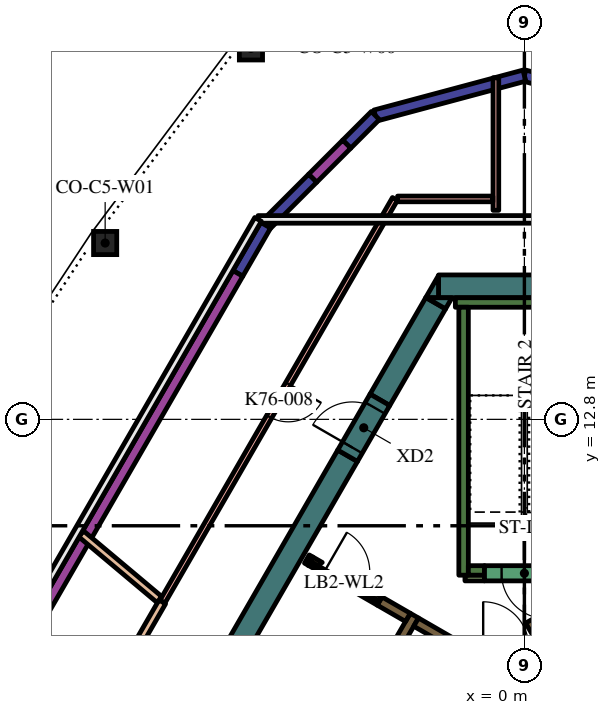
"""IFC4 building model, lengths in metres.
Left out: names, types, materials, properties, quantities, classifications, styles, units other than length and angle.
Written with IfcOpenShell. Run it as: python <this file> out.ifc"""

import sys

from ifc_helpers import new_model, si_unit, direction, frame, frame_2d, origin, origin_2d, place, context, subcontext, project, spatial, polyline, rectangle, hollow_circle, outline, extrude, element, fill, save


model = new_model("IFC4")
c1 = context("Model", 3, precision=1e-05, world=origin(), true_north=direction((0.0, 1.0)))
c2 = subcontext(c1, "Body", "Model", "MODEL_VIEW")
j1 = project(units=[si_unit("LENGTHUNIT", "METRE"), si_unit("PLANEANGLEUNIT", "RADIAN")], contexts=[c1])
p1 = place(None, origin())
s1 = spatial("IfcSite", under=j1, at=p1, CompositionType="ELEMENT")
p2 = place(p1, origin())
s2 = spatial("IfcBuilding", under=s1, at=p2, CompositionType="ELEMENT")
p3 = place(p2, frame((0.0, 0.0, 327.6)))
s3 = spatial("IfcBuildingStorey", under=s2, at=p3, CompositionType="ELEMENT", Elevation=327.6)
for number, where, z_axis, x_axis in (
    (1, (-7.195, 22.561, 0.0), (0.0, 0.0, 1.0), (1.0, 0.0, 0.0)),
    (2, (-11.032, 17.44, 0.0), (0.0, 0.0, 1.0), (1.0, 0.0, 0.0)),
):
    element("IfcColumn", number, at=place(p3, frame(where, z_axis=z_axis, x_axis=x_axis)), inside=s3, PredefinedType="COLUMN", context=c2, shape_type="SweptSolid", body=[
        extrude(hollow_circle(Radius=0.305, WallThickness=0.025, at=origin_2d()), origin(), (0.0, 0.0, 1.0), 4.2),
    ])
p4 = place(p3, frame((-2.258, 16.3, 0.0), z_axis=(0.0, 0.0, 1.0), x_axis=(1.0, 0.0, 0.0)))
e3 = element("IfcWall", 3, at=p4, inside=s3, PredefinedType="SOLIDWALL", context=c2, shape_type="SweptSolid", body=[
    extrude(rectangle(XDim=3.823, YDim=0.6, at=frame_2d((1.912, 0.0))), origin(), (0.0, 0.0, 1.0), 4.2),
])
p5 = place(p3, origin())
e4 = element("IfcWall", 4, at=p5, inside=s3, PredefinedType="SOLIDWALL", context=c2, shape_type="SweptSolid", body=[
    extrude(outline(polyline([(-2.598, 16.0), (-2.26, 16.585), (-2.26, 16.0), (-2.598, 16.0)])), origin(), (0.0, 0.0, 1.0), 4.2),
])
p6 = place(p3, frame((-2.335, 15.855, 0.0), z_axis=(0.0, 0.0, 1.0), x_axis=(-0.499960127962, -0.866048422692, 0.0)))
e5 = element("IfcWall", 5, at=p6, inside=s3, PredefinedType="SOLIDWALL", context=c2, shape_type="SweptSolid", body=[
    extrude(rectangle(XDim=2.934, YDim=0.6, at=frame_2d((1.467, 0.0))), origin(), (0.0, 0.0, 1.0), 4.2),
])
e6 = element("IfcWall", 6, at=p5, inside=s3, PredefinedType="SOLIDWALL", context=c2, shape_type="SweptSolid", body=[
    extrude(outline(polyline([(-1.905, 16.0), (-2.074, 15.707), (-2.581, 16.0), (-1.905, 16.0)])), origin(), (0.0, 0.0, 1.0), 4.2),
])
p7 = place(p3, frame((-4.652, 11.842, 0.0), z_axis=(0.0, 0.0, 1.0), x_axis=(-0.500003640647, -0.866023301845, 0.0)))
e7 = element("IfcWall", 7, at=p7, inside=s3, PredefinedType="SOLIDWALL", context=c2, shape_type="SweptSolid", body=[
    extrude(rectangle(XDim=15.858, YDim=0.6, at=frame_2d((7.929, 0.0))), origin(), (0.0, 0.0, 1.0), 4.2),
])
p8 = place(p3, frame((-1.817, 15.875, 0.0), z_axis=(0.0, 0.0, 1.0), x_axis=(1.0, 0.0, 0.0)))
e8 = element("IfcWall", 8, at=p8, inside=s3, PredefinedType="SOLIDWALL", context=c2, shape_type="SweptSolid", body=[
    extrude(rectangle(XDim=3.634, YDim=0.25, at=frame_2d((1.817, 0.0))), origin(), (0.0, 0.0, 1.0), 4.2),
])
p9 = place(p3, frame((-1.6, 8.7, 0.0), z_axis=(0.0, 0.0, 1.0), x_axis=(0.0, 1.0, 0.0)))
e9 = element("IfcWall", 9, at=p9, inside=s3, PredefinedType="SOLIDWALL", context=c2, shape_type="SweptSolid", body=[
    extrude(rectangle(XDim=7.05, YDim=0.25, at=frame_2d((3.525, 0.0))), origin(), (0.0, 0.0, 1.0), 4.2),
])
p10 = place(p3, frame((-1.475, 8.825, 0.0), z_axis=(0.0, 0.0, 1.0), x_axis=(1.0, 0.0, 0.0)))
e10 = element("IfcWall", 10, at=p10, inside=s3, PredefinedType="SOLIDWALL", context=c2, shape_type="SweptSolid", body=[
    extrude(rectangle(XDim=0.425, YDim=0.25, at=frame_2d((0.212, 0.0))), origin(), (0.0, 0.0, 1.0), 4.2),
])
p11 = place(p3, frame((0.417, 7.027, 0.0), z_axis=(0.0, 0.0, 1.0), x_axis=(-0.500210807569, 0.865903659763, 0.0)))
e11 = element("IfcWall", 11, at=p11, inside=s3, PredefinedType="SOLIDWALL", context=c2, shape_type="SweptSolid", body=[
    extrude(rectangle(XDim=0.548, YDim=0.25, at=frame_2d((0.274, 0.0))), origin(), (0.0, 0.0, 1.0), 4.2),
])
p12 = place(p3, frame((-8.06, -1.311, 0.0), z_axis=(0.0, 0.0, 1.0), x_axis=(0.50000273126, 0.866023826885, 0.0)))
e12 = element("IfcWall", 12, at=p12, inside=s3, PredefinedType="SOLIDWALL", context=c2, shape_type="SweptSolid", body=[
    extrude(rectangle(XDim=10.33, YDim=0.25, at=frame_2d((5.165, 0.0))), origin(), (0.0, 0.0, 1.0), 4.2),
])
p13 = place(p3, frame((-1.76, 6.836, 0.0), z_axis=(0.0, 0.0, 1.0), x_axis=(-0.865952863304, 0.500125622755, 0.0)))
e13 = element("IfcWall", 13, at=p13, inside=s3, PredefinedType="SOLIDWALL", context=c2, shape_type="SweptSolid", body=[
    extrude(rectangle(XDim=1.258, YDim=0.25, at=frame_2d((0.629, 0.0))), origin(), (0.0, 0.0, 1.0), 4.2),
])
p14 = place(p3, frame((-5.725, 9.125, 0.0), z_axis=(0.0, 0.0, 1.0), x_axis=(0.866185586049, -0.49972245349, 0.0)))
e14 = element("IfcWall", 14, at=p14, inside=s3, PredefinedType="SOLIDWALL", context=c2, shape_type="SweptSolid", body=[
    extrude(rectangle(XDim=0.11, YDim=0.25, at=frame_2d((0.055, 0.0))), origin(), (0.0, 0.0, 1.0), 4.2),
])
p15 = place(p3, frame((-3.066, 7.59, 0.0), z_axis=(0.0, 0.0, 1.0), x_axis=(-0.866081358704, 0.49990307071, 0.0)))
e15 = element("IfcWall", 15, at=p15, inside=s3, PredefinedType="SOLIDWALL", context=c2, shape_type="SweptSolid", body=[
    extrude(rectangle(XDim=0.858, YDim=0.25, at=frame_2d((0.429, 0.0))), origin(), (0.0, 0.0, 1.0), 4.2),
])
e16 = element("IfcWall", 16, at=p5, inside=s3, PredefinedType="SOLIDWALL", context=c2, shape_type="SweptSolid", body=[
    extrude(outline(polyline([(-3.748, 8.128), (-3.813, 8.015), (-4.027, 8.139), (-4.017, 8.156), (-4.008, 8.173), (-4.0, 8.192), (-3.995, 8.21), (-3.991, 8.23), (-3.99, 8.25), (-3.99, 8.268), (-3.748, 8.128)])), origin(), (0.0, 0.0, 1.0), 4.2),
])
e17 = element("IfcWall", 17, at=p5, inside=s3, PredefinedType="SOLIDWALL", context=c2, shape_type="SweptSolid", body=[
    extrude(outline(polyline([(-5.689, 8.96), (-5.69, 8.961), (-5.565, 9.177), (-5.319, 9.035), (-5.335, 9.026), (-5.351, 9.015), (-5.366, 9.002), (-5.379, 8.988), (-5.392, 8.972), (-5.402, 8.956), (-5.412, 8.939), (-5.629, 9.064), (-5.629, 9.064), (-5.689, 8.96)])), origin(), (0.0, 0.0, 1.0), 4.2),
])
p16 = place(p3, frame((-1.564, 8.625, 0.0), z_axis=(0.0, 0.0, 1.0), x_axis=(1.0, 0.0, 0.0)))
e18 = element("IfcWall", 18, at=p16, inside=s3, PredefinedType="PARTITIONING", context=c2, shape_type="SweptSolid", body=[
    extrude(rectangle(XDim=0.514, YDim=0.15, at=frame_2d((0.257, 0.0))), origin(), (0.0, 0.0, 1.0), 3.45),
])
p17 = place(p3, frame((1.05, 8.75, 0.0), z_axis=(0.0, 0.0, 1.0), x_axis=(-1.0, 0.0, 0.0)))
e19 = element("IfcWall", 19, at=p17, inside=s3, PredefinedType="SOLIDWALL", context=c2, shape_type="SweptSolid", body=[
    extrude(rectangle(XDim=2.1, YDim=0.4, at=frame_2d((1.05, 0.0))), origin(), (0.0, 0.0, 1.0), 4.2),
])
p18 = place(p17, frame((0.45, 0.0, 0.0)))
e20 = element("IfcOpeningElement", 20, at=p18, cuts=e19, PredefinedType="OPENING", context=c2, shape_type="SweptSolid", body=[
    extrude(rectangle(XDim=1.2, YDim=2.1, at=frame_2d((0.6, 1.05))), frame((0.0, 0.21, 0.0), z_axis=(0.0, -1.0, 0.0), x_axis=(1.0, 0.0, 0.0)), (0.0, 0.0, 1.0), 0.42),
])
p19 = place(p3, frame((-5.659, 9.012, 0.0), z_axis=(0.0, 0.0, 1.0), x_axis=(0.866009402589, -0.500027713859, 0.0)))
e21 = element("IfcWall", 21, at=p19, inside=s3, PredefinedType="PARTITIONING", context=c2, shape_type="SweptSolid", body=[
    extrude(rectangle(XDim=2.1, YDim=0.12, at=frame_2d((1.05, 0.0))), origin(), (0.0, 0.0, 1.0), 3.45),
])
p20 = place(p19, frame((0.45, 0.0, 0.0)))
e22 = element("IfcOpeningElement", 22, at=p20, cuts=e21, PredefinedType="OPENING", context=c2, shape_type="SweptSolid", body=[
    extrude(rectangle(XDim=1.2, YDim=2.1, at=frame_2d((0.6, 1.05))), frame((0.0, 0.07, 0.0), z_axis=(0.0, -1.0, 0.0), x_axis=(1.0, 0.0, 0.0)), (0.0, 0.0, 1.0), 0.14),
])
p21 = place(p3, frame((-4.652, 11.842, 0.0), z_axis=(0.0, 0.0, 1.0), x_axis=(0.500062241894, 0.865989465428, 0.0)))
e23 = element("IfcWall", 23, at=p21, inside=s3, PredefinedType="SOLIDWALL", context=c2, shape_type="SweptSolid", body=[
    extrude(rectangle(XDim=1.7, YDim=0.6, at=frame_2d((0.85, 0.0))), origin(), (0.0, 0.0, 1.0), 4.2),
])
p22 = place(p21, frame((0.25, 0.0, 0.0)))
e24 = element("IfcOpeningElement", 24, at=p22, cuts=e23, PredefinedType="OPENING", context=c2, shape_type="SweptSolid", body=[
    extrude(rectangle(XDim=1.2, YDim=2.1, at=frame_2d((0.6, 1.05))), frame((0.0, 0.31, 0.0), z_axis=(0.0, -1.0, 0.0), x_axis=(1.0, 0.0, 0.0)), (0.0, 0.0, 1.0), 0.62),
])
p23 = place(p3, frame((-9.529, 7.996, 0.0), z_axis=(0.0, 0.0, 1.0), x_axis=(-0.499982954681, -0.866035244681, 0.0)))
e25 = element("IfcWall", 25, at=p23, inside=s3, PredefinedType="PARTITIONING", context=c2, shape_type="SweptSolid", body=[
    extrude(rectangle(XDim=12.439, YDim=0.2, at=frame_2d((6.22, 0.0))), origin(), (0.0, 0.0, 1.0), 3.45),
])
p24 = place(p23, frame((5.62, 0.0, 0.0)))
e26 = element("IfcOpeningElement", 26, at=p24, cuts=e25, PredefinedType="OPENING", context=c2, shape_type="SweptSolid", body=[
    extrude(rectangle(XDim=1.2, YDim=2.1, at=frame_2d((0.6, 1.05))), frame((0.0, 0.11, 0.0), z_axis=(0.0, -1.0, 0.0), x_axis=(1.0, 0.0, 0.0)), (0.0, 0.0, 1.0), 0.22),
])
p25 = place(p3, frame((-3.406, 18.6, 0.0), z_axis=(0.0, 0.0, 1.0), x_axis=(-0.499991334387, -0.866030406821, 0.0)))
e27 = element("IfcWall", 27, at=p25, inside=s3, PredefinedType="PARTITIONING", context=c2, shape_type="SweptSolid", body=[
    extrude(rectangle(XDim=12.235, YDim=0.15, at=frame_2d((6.118, 0.0))), origin(), (0.0, 0.0, 1.0), 3.45),
])
p26 = place(p25, frame((5.617, 0.0, 0.0)))
e28 = element("IfcOpeningElement", 28, at=p26, cuts=e27, PredefinedType="OPENING", context=c2, shape_type="SweptSolid", body=[
    extrude(rectangle(XDim=1.0, YDim=2.1, at=frame_2d((0.5, 1.05))), frame((0.0, 0.085, 0.0), z_axis=(0.0, -1.0, 0.0), x_axis=(1.0, 0.0, 0.0)), (0.0, 0.0, 1.0), 0.17),
])
p27 = place(p3, frame((-0.75, 18.3, 0.0), z_axis=(0.0, 0.0, 1.0), x_axis=(0.0, 1.0, 0.0)))
e29 = element("IfcWall", 29, at=p27, inside=s3, PredefinedType="PARTITIONING", context=c2, shape_type="SweptSolid", body=[
    extrude(rectangle(XDim=3.489, YDim=0.15, at=frame_2d((1.744, 0.0))), origin(), (0.0, 0.0, 1.0), 3.45),
])
p28 = place(p3, frame((-3.336, 18.6, 0.0), z_axis=(0.0, 0.0, 1.0), x_axis=(1.0, 0.0, 0.0)))
e30 = element("IfcWall", 30, at=p28, inside=s3, PredefinedType="PARTITIONING", context=c2, shape_type="SweptSolid", body=[
    extrude(rectangle(XDim=2.506, YDim=0.15, at=frame_2d((1.253, 0.0))), origin(), (0.0, 0.0, 1.0), 3.45),
])
p29 = place(p3, frame((-9.605, 8.06, 0.0), z_axis=(0.0, 0.0, 1.0), x_axis=(-0.766005403392, 0.642834132552, 0.0)))
e31 = element("IfcWall", 31, at=p29, inside=s3, PredefinedType="PARTITIONING", context=c2, shape_type="SweptSolid", body=[
    extrude(rectangle(XDim=2.688, YDim=0.2, at=frame_2d((1.344, 0.0))), origin(), (0.0, 0.0, 1.0), 3.45),
])
for number, where, z_axis, x_axis in (
    (32, (3.922, 20.794, 0.0), (0.0, 0.0, 1.0), (-0.966, 0.259, 0.0)),
    (33, (0.0, 21.845, 0.0), (0.0, 0.0, 1.0), (-0.966, -0.259, 0.0)),
):
    element("IfcWall", number, at=place(p3, frame(where, z_axis=z_axis, x_axis=x_axis)), inside=s3, PredefinedType="SOLIDWALL", context=c2, shape_type="SweptSolid", body=[
        extrude(rectangle(XDim=4.061, YDim=0.3, at=frame_2d((2.03, 0.0))), origin(), (0.0, 0.0, 1.0), 3.95),
    ])
p30 = place(p3, frame((-3.922, 20.794, 0.0), z_axis=(0.0, 0.0, 1.0), x_axis=(-0.707106781187, -0.707106781187, 0.0)))
e34 = element("IfcWall", 34, at=p30, inside=s3, PredefinedType="SOLIDWALL", context=c2, shape_type="SweptSolid", body=[
    extrude(rectangle(XDim=1.065, YDim=0.3, at=frame_2d((0.532, 0.0))), origin(), (0.0, 0.0, 1.0), 3.95),
])
p31 = place(p3, frame((-4.675, 20.041, 0.0), z_axis=(0.0, 0.0, 1.0), x_axis=(-0.707106781187, -0.707106781187, 0.0)))
e35 = element("IfcWall", 35, at=p31, inside=s3, PredefinedType="SOLIDWALL", context=c2, shape_type="SweptSolid", body=[
    extrude(rectangle(XDim=1.264, YDim=0.3, at=frame_2d((0.632, 0.0))), origin(), (0.0, 0.0, 1.0), 3.45),
])
p32 = place(p3, frame((-5.569, 19.147, 0.0), z_axis=(0.0, 0.0, 1.0), x_axis=(-0.707106781187, -0.707106781187, 0.0)))
e36 = element("IfcWall", 36, at=p32, inside=s3, PredefinedType="SOLIDWALL", context=c2, shape_type="SweptSolid", body=[
    extrude(rectangle(XDim=1.752, YDim=0.3, at=frame_2d((0.876, 0.0))), origin(), (0.0, 0.0, 1.0), 3.95),
])
p33 = place(p3, frame((-6.808, 17.908, 0.0), z_axis=(0.0, 0.0, 1.0), x_axis=(-0.499977492351, -0.866038398192, 0.0)))
e37 = element("IfcWall", 37, at=p33, inside=s3, PredefinedType="SOLIDWALL", context=c2, shape_type="SweptSolid", body=[
    extrude(rectangle(XDim=1.464, YDim=0.3, at=frame_2d((0.732, 0.0))), origin(), (0.0, 0.0, 1.0), 3.95),
])
p34 = place(p3, frame((-7.54, 16.64, 0.0), z_axis=(0.0, 0.0, 1.0), x_axis=(-0.500002158106, -0.866024157798, 0.0)))
e38 = element("IfcWall", 38, at=p34, inside=s3, PredefinedType="SOLIDWALL", context=c2, shape_type="SweptSolid", body=[
    extrude(rectangle(XDim=21.282, YDim=0.3, at=frame_2d((10.641, 0.0))), origin(), (0.0, 0.0, 1.0), 3.45),
])
p35 = place(p18, origin())
e39 = element("IfcDoor", 39, at=p35, inside=s3, OperationType="SINGLE_SWING_LEFT", PredefinedType="DOOR", context=c2, shape_type="SweptSolid", body=[
    extrude(rectangle(XDim=1.2, YDim=2.1, at=frame_2d((0.6, 1.05))), frame((0.0, 0.025, 0.0), z_axis=(0.0, -1.0, 0.0), x_axis=(1.0, 0.0, 0.0)), (0.0, 0.0, 1.0), 0.05),
])
fill(e20, e39)
p36 = place(p20, origin())
e40 = element("IfcDoor", 40, at=p36, inside=s3, OperationType="SINGLE_SWING_LEFT", PredefinedType="DOOR", context=c2, shape_type="SweptSolid", body=[
    extrude(rectangle(XDim=1.2, YDim=2.1, at=frame_2d((0.6, 1.05))), frame((0.0, 0.025, 0.0), z_axis=(0.0, -1.0, 0.0), x_axis=(1.0, 0.0, 0.0)), (0.0, 0.0, 1.0), 0.05),
])
fill(e22, e40)
p37 = place(p22, origin())
e41 = element("IfcDoor", 41, at=p37, inside=s3, OperationType="SINGLE_SWING_LEFT", PredefinedType="DOOR", context=c2, shape_type="SweptSolid", body=[
    extrude(rectangle(XDim=1.2, YDim=2.1, at=frame_2d((0.6, 1.05))), frame((0.0, 0.025, 0.0), z_axis=(0.0, -1.0, 0.0), x_axis=(1.0, 0.0, 0.0)), (0.0, 0.0, 1.0), 0.05),
])
fill(e24, e41)
p38 = place(p26, origin())
e42 = element("IfcDoor", 42, at=p38, inside=s3, OperationType="SINGLE_SWING_RIGHT", PredefinedType="DOOR", context=c2, shape_type="SweptSolid", body=[
    extrude(rectangle(XDim=1.0, YDim=2.1, at=frame_2d((0.5, 1.05))), frame((0.0, 0.025, 0.0), z_axis=(0.0, -1.0, 0.0), x_axis=(1.0, 0.0, 0.0)), (0.0, 0.0, 1.0), 0.05),
])
fill(e28, e42)
save(model, sys.argv[1])
